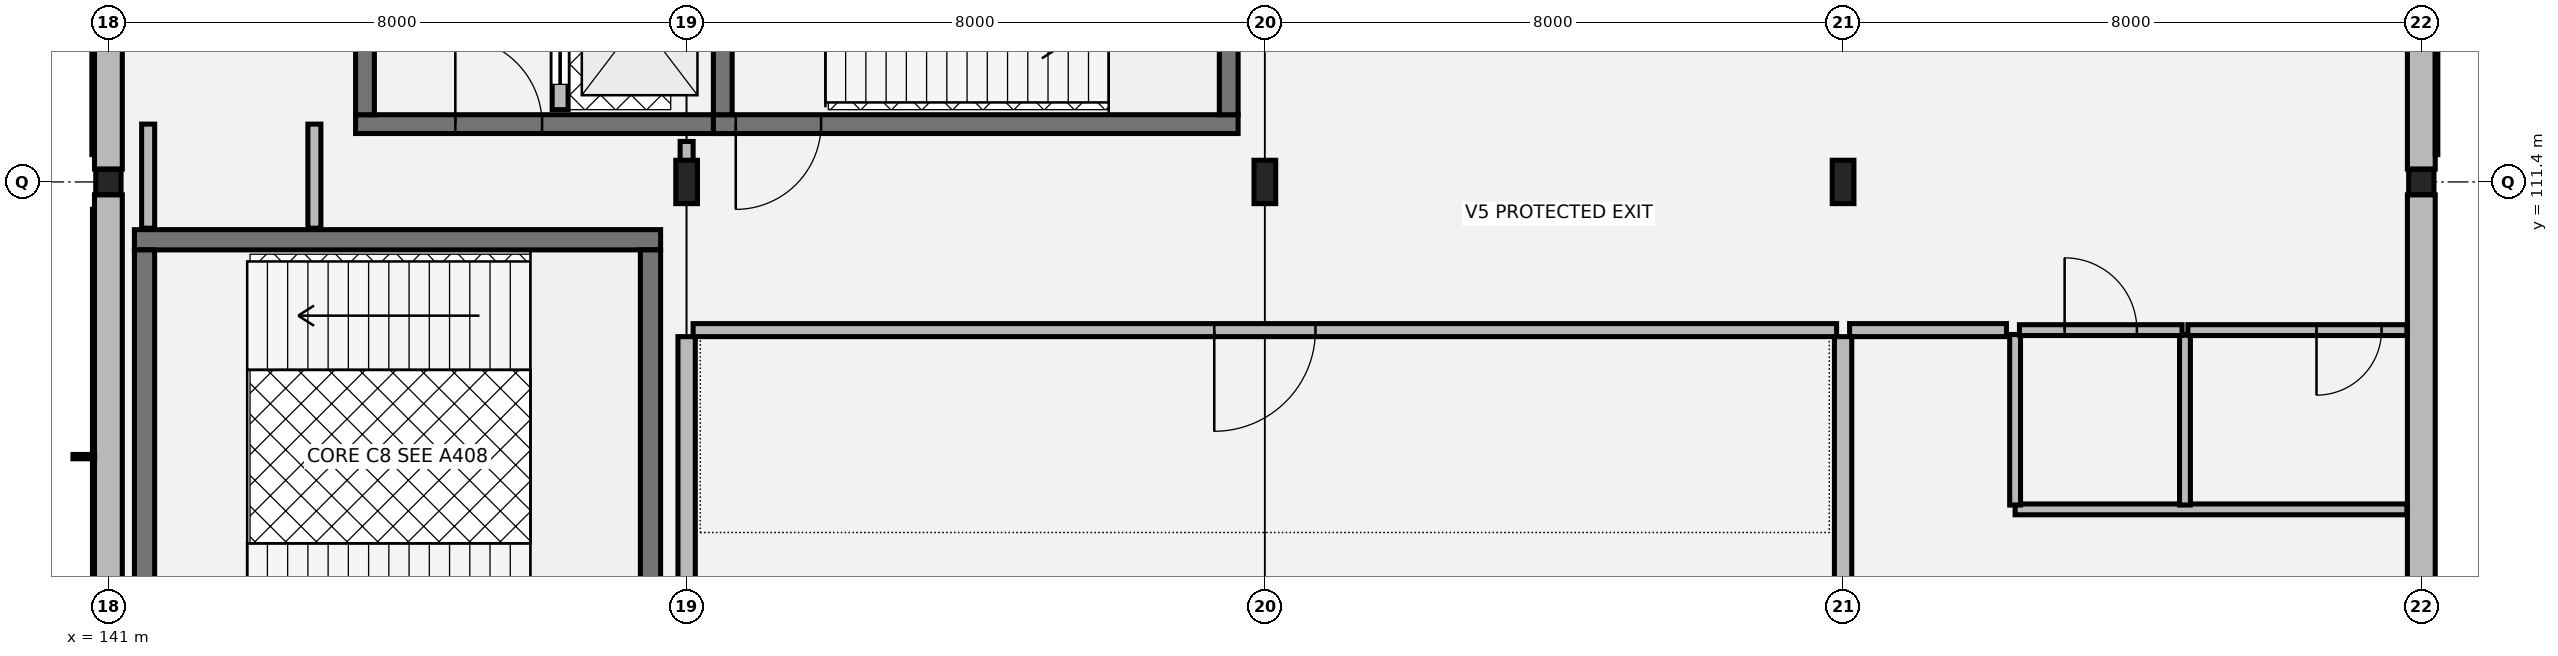
"""IFC4 building model, lengths in metres.
Left out: names, types, materials, properties, quantities, classifications, styles, units other than length and angle.
Written with IfcOpenShell. Run it as: python <this file> out.ifc"""

import sys

from ifc_helpers import new_model, si_unit, direction, frame, frame_2d, origin, origin_2d, place, context, subcontext, project, spatial, rectangle, hollow_rectangle, i_section, extrude, element, fill, save


model = new_model("IFC4")
c1 = context("Model", 3, precision=1e-05, world=origin(), true_north=direction((0.0, 1.0)))
c2 = subcontext(c1, "Body", "Model", "MODEL_VIEW")
j1 = project(units=[si_unit("LENGTHUNIT", "METRE"), si_unit("PLANEANGLEUNIT", "RADIAN")], contexts=[c1])
p1 = place(None, origin())
s1 = spatial("IfcSite", under=j1, at=p1, CompositionType="ELEMENT")
p2 = place(p1, origin())
s2 = spatial("IfcBuilding", under=s1, at=p2, CompositionType="ELEMENT")
p3 = place(p2, origin())
s3 = spatial("IfcBuildingStorey", under=s2, at=p3, CompositionType="ELEMENT", Elevation=0.0)
p4 = place(p3, frame((141.0, 111.4, 0.0), z_axis=(0.0, 0.0, 1.0), x_axis=(1.0, 0.0, 0.0)))
e1 = element("IfcColumn", 1, at=p4, inside=s3, PredefinedType="COLUMN", context=c2, shape_type="SweptSolid", body=[
    extrude(hollow_rectangle(XDim=0.35, YDim=0.35, WallThickness=0.014, at=origin_2d()), origin(), (0.0, 0.0, 1.0), 5.075),
])
for number, where, z_axis, x_axis in (
    (2, (149.0, 111.4, 0.0), (0.0, 0.0, 1.0), (1.0, 0.0, 0.0)),
    (3, (157.0, 111.4, 0.0), (0.0, 0.0, 1.0), (1.0, 0.0, 0.0)),
    (4, (165.0, 111.4, 0.0), (0.0, 0.0, 1.0), (1.0, 0.0, 0.0)),
):
    element("IfcColumn", number, at=place(p3, frame(where, z_axis=z_axis, x_axis=x_axis)), inside=s3, PredefinedType="COLUMN", context=c2, shape_type="SweptSolid", body=[
        extrude(i_section(OverallWidth=0.3, OverallDepth=0.6, WebThickness=0.015, FlangeThickness=0.03, at=origin_2d()), origin(), (0.0, 0.0, 1.0), 5.075),
    ])
p5 = place(p3, frame((173.0, 111.4, 0.0), z_axis=(0.0, 0.0, 1.0), x_axis=(1.0, 0.0, 0.0)))
e5 = element("IfcColumn", 5, at=p5, inside=s3, PredefinedType="COLUMN", context=c2, shape_type="SweptSolid", body=[
    extrude(hollow_rectangle(XDim=0.35, YDim=0.35, WallThickness=0.014, at=origin_2d()), origin(), (0.0, 0.0, 1.0), 5.075),
])
p6 = place(p3, frame((173.0, 103.978, 0.0), z_axis=(0.0, 0.0, 1.0), x_axis=(0.0, 1.0, 0.0)))
e6 = element("IfcWall", 6, at=p6, inside=s3, PredefinedType="SOLIDWALL", context=c2, shape_type="SweptSolid", body=[
    extrude(rectangle(XDim=7.244, YDim=0.385, at=frame_2d((3.622, 0.0))), origin(), (0.0, 0.0, 1.0), 4.5),
])
p7 = place(p3, frame((173.0, 111.578, 0.0), z_axis=(0.0, 0.0, 1.0), x_axis=(0.0, 1.0, 0.0)))
e7 = element("IfcWall", 7, at=p7, inside=s3, PredefinedType="SOLIDWALL", context=c2, shape_type="SweptSolid", body=[
    extrude(rectangle(XDim=7.244, YDim=0.385, at=frame_2d((3.622, 0.0))), origin(), (0.0, 0.0, 1.0), 4.5),
])
p8 = place(p7, frame((2.347, 0.0, 0.8)))
e8 = element("IfcOpeningElement", 8, at=p8, cuts=e7, PredefinedType="OPENING", context=c2, shape_type="SweptSolid", body=[
    extrude(rectangle(XDim=0.95, YDim=2.0, at=frame_2d((0.475, 1.0))), frame((0.0, 0.202, 0.0), z_axis=(0.0, -1.0, 0.0), x_axis=(1.0, 0.0, 0.0)), (0.0, 0.0, 1.0), 0.405),
])
p9 = place(p7, frame((3.947, 0.0, 0.8)))
e9 = element("IfcOpeningElement", 9, at=p9, cuts=e7, PredefinedType="OPENING", context=c2, shape_type="SweptSolid", body=[
    extrude(rectangle(XDim=0.95, YDim=2.0, at=frame_2d((0.475, 1.0))), frame((0.0, 0.202, 0.0), z_axis=(0.0, -1.0, 0.0), x_axis=(1.0, 0.0, 0.0)), (0.0, 0.0, 1.0), 0.405),
])
p10 = place(p3, frame((141.0, 118.822, 0.0), z_axis=(0.0, 0.0, 1.0), x_axis=(0.0, -1.0, 0.0)))
e10 = element("IfcWall", 10, at=p10, inside=s3, PredefinedType="SOLIDWALL", context=c2, shape_type="SweptSolid", body=[
    extrude(rectangle(XDim=7.244, YDim=0.385, at=frame_2d((3.622, 0.0))), origin(), (0.0, 0.0, 1.0), 4.5),
])
p11 = place(p10, frame((2.347, 0.0, 0.8)))
e11 = element("IfcOpeningElement", 11, at=p11, cuts=e10, PredefinedType="OPENING", context=c2, shape_type="SweptSolid", body=[
    extrude(rectangle(XDim=0.95, YDim=2.0, at=frame_2d((0.475, 1.0))), frame((0.0, 0.202, 0.0), z_axis=(0.0, -1.0, 0.0), x_axis=(1.0, 0.0, 0.0)), (0.0, 0.0, 1.0), 0.405),
])
p12 = place(p10, frame((3.947, 0.0, 0.8)))
e12 = element("IfcOpeningElement", 12, at=p12, cuts=e10, PredefinedType="OPENING", context=c2, shape_type="SweptSolid", body=[
    extrude(rectangle(XDim=0.95, YDim=2.0, at=frame_2d((0.475, 1.0))), frame((0.0, 0.202, 0.0), z_axis=(0.0, -1.0, 0.0), x_axis=(1.0, 0.0, 0.0)), (0.0, 0.0, 1.0), 0.405),
])
p13 = place(p3, frame((141.0, 111.222, 0.0), z_axis=(0.0, 0.0, 1.0), x_axis=(0.0, -1.0, 0.0)))
e13 = element("IfcWall", 13, at=p13, inside=s3, PredefinedType="SOLIDWALL", context=c2, shape_type="SweptSolid", body=[
    extrude(rectangle(XDim=7.244, YDim=0.385, at=frame_2d((3.622, 0.0))), origin(), (0.0, 0.0, 1.0), 4.5),
])
p14 = place(p3, frame((144.42, 112.2, 0.0), z_axis=(0.0, 0.0, 1.0), x_axis=(1.0, 0.0, 0.0)))
e14 = element("IfcWall", 14, at=p14, inside=s3, PredefinedType="SHEAR", context=c2, shape_type="SweptSolid", body=[
    extrude(rectangle(XDim=5.21, YDim=0.26, at=frame_2d((2.605, 0.0))), origin(), (0.0, 0.0, 1.0), 4.865),
])
p15 = place(p14, frame((1.38, 0.0, 0.0)))
e15 = element("IfcOpeningElement", 15, at=p15, cuts=e14, PredefinedType="OPENING", context=c2, shape_type="SweptSolid", body=[
    extrude(rectangle(XDim=1.2, YDim=2.16, at=frame_2d((0.6, 1.08))), frame((0.0, 0.14, 0.0), z_axis=(0.0, -1.0, 0.0), x_axis=(1.0, 0.0, 0.0)), (0.0, 0.0, 1.0), 0.28),
])
p16 = place(p3, frame((144.55, 118.07, 0.0), z_axis=(0.0, 0.0, 1.0), x_axis=(0.0, -1.0, 0.0)))
e16 = element("IfcWall", 16, at=p16, inside=s3, PredefinedType="SHEAR", context=c2, shape_type="SweptSolid", body=[
    extrude(rectangle(XDim=5.74, YDim=0.26, at=frame_2d((2.87, 0.0))), origin(), (0.0, 0.0, 1.0), 4.865),
])
p17 = place(p3, frame((147.25, 112.4, 0.0), z_axis=(0.0, 0.0, 1.0), x_axis=(0.0, 1.0, 0.0)))
e17 = element("IfcWall", 17, at=p17, inside=s3, PredefinedType="SOLIDWALL", context=c2, shape_type="SweptSolid", body=[
    extrude(rectangle(XDim=5.6, YDim=0.22, at=frame_2d((2.8, 0.0))), origin(), (0.0, 0.0, 1.0), 4.865),
])
p18 = place(p17, frame((0.35, 0.0, 0.0)))
e18 = element("IfcOpeningElement", 18, at=p18, cuts=e17, PredefinedType="OPENING", context=c2, shape_type="SweptSolid", body=[
    extrude(rectangle(XDim=1.1, YDim=2.15, at=frame_2d((0.55, 1.075))), frame((0.0, 0.12, 0.0), z_axis=(0.0, -1.0, 0.0), x_axis=(1.0, 0.0, 0.0)), (0.0, 0.0, 1.0), 0.24),
])
p19 = place(p17, frame((2.4, 0.0, 0.0)))
e19 = element("IfcOpeningElement", 19, at=p19, cuts=e17, PredefinedType="OPENING", context=c2, shape_type="SweptSolid", body=[
    extrude(rectangle(XDim=1.3, YDim=2.18, at=frame_2d((0.65, 1.09))), frame((0.0, 0.12, 0.0), z_axis=(0.0, -1.0, 0.0), x_axis=(1.0, 0.0, 0.0)), (0.0, 0.0, 1.0), 0.24),
])
p20 = place(p3, frame((149.37, 112.2, 0.0), z_axis=(0.0, 0.0, 1.0), x_axis=(1.0, 0.0, 0.0)))
e20 = element("IfcWall", 20, at=p20, inside=s3, PredefinedType="SHEAR", context=c2, shape_type="SweptSolid", body=[
    extrude(rectangle(XDim=7.26, YDim=0.26, at=frame_2d((3.63, 0.0))), origin(), (0.0, 0.0, 1.0), 4.865),
])
p21 = place(p20, frame((0.31, 0.0, 0.0)))
e21 = element("IfcOpeningElement", 21, at=p21, cuts=e20, PredefinedType="OPENING", context=c2, shape_type="SweptSolid", body=[
    extrude(rectangle(XDim=1.18, YDim=2.18, at=frame_2d((0.59, 1.09))), frame((0.0, 0.14, 0.0), z_axis=(0.0, -1.0, 0.0), x_axis=(1.0, 0.0, 0.0)), (0.0, 0.0, 1.0), 0.28),
])
for number, where, z_axis, x_axis in (
    (22, (149.5, 112.33, 0.0), (0.0, 0.0, 1.0), (0.0, 1.0, 0.0)),
    (23, (156.5, 112.33, 0.0), (0.0, 0.0, 1.0), (0.0, 1.0, 0.0)),
):
    element("IfcWall", number, at=place(p3, frame(where, z_axis=z_axis, x_axis=x_axis)), inside=s3, PredefinedType="SHEAR", context=c2, shape_type="SweptSolid", body=[
        extrude(rectangle(XDim=5.74, YDim=0.26, at=frame_2d((2.87, 0.0))), origin(), (0.0, 0.0, 1.0), 4.865),
    ])
p22 = place(p3, frame((141.36, 110.6, 0.0), z_axis=(0.0, 0.0, 1.0), x_axis=(1.0, 0.0, 0.0)))
e24 = element("IfcWall", 24, at=p22, inside=s3, PredefinedType="SHEAR", context=c2, shape_type="SweptSolid", body=[
    extrude(rectangle(XDim=7.28, YDim=0.28, at=frame_2d((3.64, 0.0))), origin(), (0.0, 0.0, 1.0), 4.865),
])
for number, where, z_axis, x_axis in (
    (25, (141.5, 104.74, 0.0), (0.0, 0.0, 1.0), (0.0, 1.0, 0.0)),
    (26, (148.5, 104.74, 0.0), (0.0, 0.0, 1.0), (0.0, 1.0, 0.0)),
):
    element("IfcWall", number, at=place(p3, frame(where, z_axis=z_axis, x_axis=x_axis)), inside=s3, PredefinedType="SHEAR", context=c2, shape_type="SweptSolid", body=[
        extrude(rectangle(XDim=5.72, YDim=0.28, at=frame_2d((2.86, 0.0))), origin(), (0.0, 0.0, 1.0), 4.865),
    ])
p23 = place(p3, frame((167.38, 106.87, 0.0), z_axis=(0.0, 0.0, 1.0), x_axis=(1.0, 0.0, 0.0)))
e27 = element("IfcWall", 27, at=p23, inside=s3, PredefinedType="PARTITIONING", context=c2, shape_type="SweptSolid", body=[
    extrude(rectangle(XDim=5.42, YDim=0.15, at=frame_2d((2.71, 0.0))), origin(), (0.0, 0.0, 1.0), 4.2),
])
for number, where, z_axis, x_axis in (
    (28, (167.38, 106.93, 0.0), (0.0, 0.0, 1.0), (0.0, 1.0, 0.0)),
    (29, (169.73, 106.93, 0.0), (0.0, 0.0, 1.0), (0.0, 1.0, 0.0)),
):
    element("IfcWall", number, at=place(p3, frame(where, z_axis=z_axis, x_axis=x_axis)), inside=s3, PredefinedType="PARTITIONING", context=c2, shape_type="SweptSolid", body=[
        extrude(rectangle(XDim=2.36, YDim=0.15, at=frame_2d((1.18, 0.0))), origin(), (0.0, 0.0, 1.0), 4.2),
    ])
p24 = place(p3, frame((167.44, 109.35, 0.0), z_axis=(0.0, 0.0, 1.0), x_axis=(1.0, 0.0, 0.0)))
e30 = element("IfcWall", 30, at=p24, inside=s3, PredefinedType="PARTITIONING", context=c2, shape_type="SweptSolid", body=[
    extrude(rectangle(XDim=2.25, YDim=0.15, at=frame_2d((1.125, 0.0))), origin(), (0.0, 0.0, 1.0), 4.2),
])
p25 = place(p24, frame((0.625, 0.0, 0.0)))
e31 = element("IfcOpeningElement", 31, at=p25, cuts=e30, PredefinedType="OPENING", context=c2, shape_type="SweptSolid", body=[
    extrude(rectangle(XDim=1.0, YDim=2.15, at=frame_2d((0.5, 1.075))), frame((0.0, 0.085, 0.0), z_axis=(0.0, -1.0, 0.0), x_axis=(1.0, 0.0, 0.0)), (0.0, 0.0, 1.0), 0.17),
])
p26 = place(p3, frame((169.77, 109.35, 0.0), z_axis=(0.0, 0.0, 1.0), x_axis=(1.0, 0.0, 0.0)))
e32 = element("IfcWall", 32, at=p26, inside=s3, PredefinedType="PARTITIONING", context=c2, shape_type="SweptSolid", body=[
    extrude(rectangle(XDim=3.03, YDim=0.15, at=frame_2d((1.515, 0.0))), origin(), (0.0, 0.0, 1.0), 4.2),
])
p27 = place(p26, frame((1.78, 0.0, 0.0)))
e33 = element("IfcOpeningElement", 33, at=p27, cuts=e32, PredefinedType="OPENING", context=c2, shape_type="SweptSolid", body=[
    extrude(rectangle(XDim=0.9, YDim=2.15, at=frame_2d((0.45, 1.075))), frame((0.0, 0.085, 0.0), z_axis=(0.0, -1.0, 0.0), x_axis=(1.0, 0.0, 0.0)), (0.0, 0.0, 1.0), 0.17),
])
p28 = place(p3, frame((149.09, 109.35, 0.0), z_axis=(0.0, 0.0, 1.0), x_axis=(1.0, 0.0, 0.0)))
e34 = element("IfcWall", 34, at=p28, inside=s3, PredefinedType="PARTITIONING", context=c2, shape_type="SweptSolid", body=[
    extrude(rectangle(XDim=15.82, YDim=0.18, at=frame_2d((7.91, 0.0))), origin(), (0.0, 0.0, 1.0), 4.2),
])
p29 = place(p28, frame((7.21, 0.0, 0.0)))
e35 = element("IfcOpeningElement", 35, at=p29, cuts=e34, PredefinedType="OPENING", context=c2, shape_type="SweptSolid", body=[
    extrude(rectangle(XDim=1.4, YDim=2.22, at=frame_2d((0.7, 1.11))), frame((0.0, 0.1, 0.0), z_axis=(0.0, -1.0, 0.0), x_axis=(1.0, 0.0, 0.0)), (0.0, 0.0, 1.0), 0.2),
])
p30 = place(p3, frame((165.09, 109.35, 0.0), z_axis=(0.0, 0.0, 1.0), x_axis=(1.0, 0.0, 0.0)))
e36 = element("IfcWall", 36, at=p30, inside=s3, PredefinedType="PARTITIONING", context=c2, shape_type="SweptSolid", body=[
    extrude(rectangle(XDim=2.17, YDim=0.18, at=frame_2d((1.085, 0.0))), origin(), (0.0, 0.0, 1.0), 4.2),
])
p31 = place(p3, frame((149.0, 111.64, 0.0), z_axis=(0.0, 0.0, 1.0), x_axis=(0.0, 1.0, 0.0)))
e37 = element("IfcWall", 37, at=p31, inside=s3, PredefinedType="PARTITIONING", context=c2, shape_type="SweptSolid", body=[
    extrude(rectangle(XDim=0.32, YDim=0.18, at=frame_2d((0.16, 0.0))), origin(), (0.0, 0.0, 1.0), 4.2),
])
for number, where, z_axis, x_axis in (
    (38, (141.55, 110.76, 0.0), (0.0, 0.0, 1.0), (0.0, 1.0, 0.0)),
    (39, (143.85, 110.76, 0.0), (0.0, 0.0, 1.0), (0.0, 1.0, 0.0)),
):
    element("IfcWall", number, at=place(p3, frame(where, z_axis=z_axis, x_axis=x_axis)), inside=s3, PredefinedType="PARTITIONING", context=c2, shape_type="SweptSolid", body=[
        extrude(rectangle(XDim=1.44, YDim=0.18, at=frame_2d((0.72, 0.0))), origin(), (0.0, 0.0, 1.0), 4.2),
    ])
p32 = place(p3, frame((149.0, 73.72, 0.0), z_axis=(0.0, 0.0, 1.0), x_axis=(0.0, 1.0, 0.0)))
e40 = element("IfcWall", 40, at=p32, inside=s3, PredefinedType="SOLIDWALL", context=c2, shape_type="SweptSolid", body=[
    extrude(rectangle(XDim=35.54, YDim=0.24, at=frame_2d((17.77, 0.0))), origin(), (0.0, 0.0, 1.0), 4.2),
])
p33 = place(p32, frame((17.12, 0.0, 0.0)))
e41 = element("IfcOpeningElement", 41, at=p33, cuts=e40, PredefinedType="OPENING", context=c2, shape_type="SweptSolid", body=[
    extrude(rectangle(XDim=1.3, YDim=2.2, at=frame_2d((0.65, 1.1))), frame((0.0, 0.13, 0.0), z_axis=(0.0, -1.0, 0.0), x_axis=(1.0, 0.0, 0.0)), (0.0, 0.0, 1.0), 0.26),
])
p34 = place(p3, frame((165.0, 73.72, 0.0), z_axis=(0.0, 0.0, 1.0), x_axis=(0.0, 1.0, 0.0)))
e42 = element("IfcWall", 42, at=p34, inside=s3, PredefinedType="SOLIDWALL", context=c2, shape_type="SweptSolid", body=[
    extrude(rectangle(XDim=35.54, YDim=0.24, at=frame_2d((17.77, 0.0))), origin(), (0.0, 0.0, 1.0), 4.2),
])
p35 = place(p34, frame((17.12, 0.0, 0.0)))
e43 = element("IfcOpeningElement", 43, at=p35, cuts=e42, PredefinedType="OPENING", context=c2, shape_type="SweptSolid", body=[
    extrude(rectangle(XDim=1.3, YDim=2.2, at=frame_2d((0.65, 1.1))), frame((0.0, 0.13, 0.0), z_axis=(0.0, -1.0, 0.0), x_axis=(1.0, 0.0, 0.0)), (0.0, 0.0, 1.0), 0.26),
])
p36 = place(p15, origin())
e44 = element("IfcDoor", 44, at=p36, inside=s3, OperationType="SINGLE_SWING_LEFT", PredefinedType="DOOR", context=c2, shape_type="SweptSolid", body=[
    extrude(rectangle(XDim=1.2, YDim=2.16, at=frame_2d((0.6, 1.08))), frame((0.0, 0.025, 0.0), z_axis=(0.0, -1.0, 0.0), x_axis=(1.0, 0.0, 0.0)), (0.0, 0.0, 1.0), 0.05),
])
fill(e15, e44)
p37 = place(p18, origin())
e45 = element("IfcDoor", 45, at=p37, inside=s3, OperationType="SLIDING_TO_LEFT", PredefinedType="DOOR", context=c2, shape_type="SweptSolid", body=[
    extrude(rectangle(XDim=1.1, YDim=2.15, at=frame_2d((0.55, 1.075))), frame((0.0, 0.025, 0.0), z_axis=(0.0, -1.0, 0.0), x_axis=(1.0, 0.0, 0.0)), (0.0, 0.0, 1.0), 0.05),
])
fill(e18, e45)
p38 = place(p21, origin())
e46 = element("IfcDoor", 46, at=p38, inside=s3, OperationType="SINGLE_SWING_RIGHT", PredefinedType="DOOR", context=c2, shape_type="SweptSolid", body=[
    extrude(rectangle(XDim=1.18, YDim=2.18, at=frame_2d((0.59, 1.09))), frame((0.0, 0.025, 0.0), z_axis=(0.0, -1.0, 0.0), x_axis=(1.0, 0.0, 0.0)), (0.0, 0.0, 1.0), 0.05),
])
fill(e21, e46)
p39 = place(p25, origin())
e47 = element("IfcDoor", 47, at=p39, inside=s3, OperationType="SINGLE_SWING_LEFT", PredefinedType="DOOR", context=c2, shape_type="SweptSolid", body=[
    extrude(rectangle(XDim=1.0, YDim=2.15, at=frame_2d((0.5, 1.075))), frame((0.0, 0.025, 0.0), z_axis=(0.0, -1.0, 0.0), x_axis=(1.0, 0.0, 0.0)), (0.0, 0.0, 1.0), 0.05),
])
fill(e31, e47)
p40 = place(p27, origin())
e48 = element("IfcDoor", 48, at=p40, inside=s3, OperationType="SINGLE_SWING_RIGHT", PredefinedType="DOOR", context=c2, shape_type="SweptSolid", body=[
    extrude(rectangle(XDim=0.9, YDim=2.15, at=frame_2d((0.45, 1.075))), frame((0.0, 0.025, 0.0), z_axis=(0.0, -1.0, 0.0), x_axis=(1.0, 0.0, 0.0)), (0.0, 0.0, 1.0), 0.05),
])
fill(e33, e48)
p41 = place(p29, origin())
e49 = element("IfcDoor", 49, at=p41, inside=s3, OperationType="SINGLE_SWING_RIGHT", PredefinedType="DOOR", context=c2, shape_type="SweptSolid", body=[
    extrude(rectangle(XDim=1.4, YDim=2.22, at=frame_2d((0.7, 1.11))), frame((0.0, 0.025, 0.0), z_axis=(0.0, -1.0, 0.0), x_axis=(1.0, 0.0, 0.0)), (0.0, 0.0, 1.0), 0.05),
])
fill(e35, e49)
save(model, sys.argv[1])
